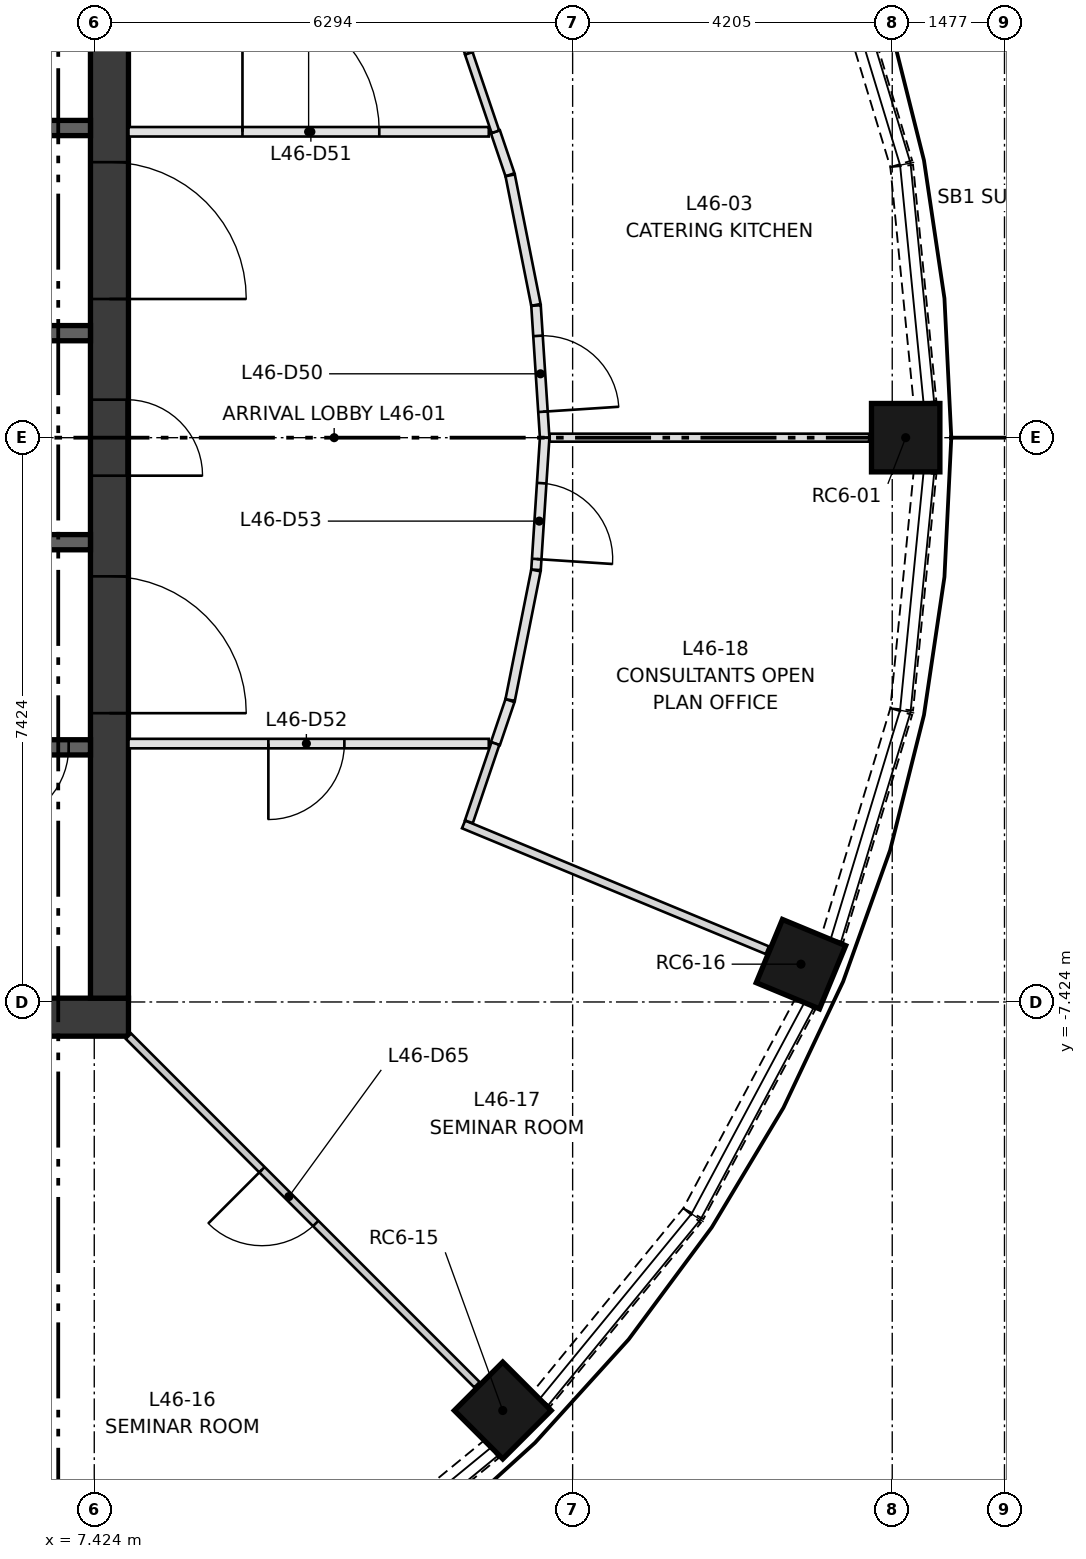
"""IFC4 building model, lengths in metres.
Left out: names, types, materials, properties, quantities, classifications, styles, units other than length and angle.
Written with IfcOpenShell. Run it as: python <this file> out.ifc"""

import sys

from ifc_helpers import new_model, si_unit, direction, frame, frame_2d, origin, origin_2d, place, context, subcontext, project, spatial, rectangle, extrude, element, fill, save


model = new_model("IFC4")
c1 = context("Model", 3, precision=1e-05, world=origin(), true_north=direction((0.0, 1.0)))
c2 = subcontext(c1, "Body", "Model", "MODEL_VIEW")
j1 = project(units=[si_unit("LENGTHUNIT", "METRE"), si_unit("PLANEANGLEUNIT", "RADIAN")], contexts=[c1])
p1 = place(None, origin())
s1 = spatial("IfcSite", under=j1, at=p1, CompositionType="ELEMENT")
p2 = place(p1, origin())
s2 = spatial("IfcBuilding", under=s1, at=p2, CompositionType="ELEMENT")
p3 = place(p2, frame((0.0, 0.0, 174.25)))
s3 = spatial("IfcBuildingStorey", under=s2, at=p3, CompositionType="ELEMENT", Elevation=174.25)
for number, where, z_axis, x_axis in (
    (1, (18.1, 0.0, 0.0), (0.0, 0.0, 1.0), (1.0, 0.0, 0.0)),
    (2, (12.799, -12.799, 0.0), (0.0, 0.0, 1.0), (0.707, -0.707, 0.0)),
    (3, (16.722, -6.927, 0.0), (0.0, 0.0, 1.0), (0.924, -0.383, 0.0)),
):
    element("IfcColumn", number, at=place(p3, frame(where, z_axis=z_axis, x_axis=x_axis)), inside=s3, PredefinedType="COLUMN", context=c2, shape_type="SweptSolid", body=[
        extrude(rectangle(XDim=0.9, YDim=0.9, at=origin_2d()), origin(), (0.0, 0.0, 1.0), 3.35),
    ])
p4 = place(p3, frame((-7.874, -7.624, 0.0), z_axis=(0.0, 0.0, 1.0), x_axis=(1.0, 0.0, 0.0)))
e4 = element("IfcWall", 4, at=p4, inside=s3, PredefinedType="SHEAR", context=c2, shape_type="SweptSolid", body=[
    extrude(rectangle(XDim=15.748, YDim=0.5, at=frame_2d((7.874, 0.0))), origin(), (0.0, 0.0, 1.0), 3.35),
])
p5 = place(p3, frame((7.624, -7.374, 0.0), z_axis=(0.0, 0.0, 1.0), x_axis=(0.0, 1.0, 0.0)))
e5 = element("IfcWall", 5, at=p5, inside=s3, PredefinedType="SHEAR", context=c2, shape_type="SweptSolid", body=[
    extrude(rectangle(XDim=14.748, YDim=0.5, at=frame_2d((7.374, 0.0))), origin(), (0.0, 0.0, 1.0), 3.35),
])
p6 = place(p5, frame((6.874, 0.0, 0.0)))
e6 = element("IfcOpeningElement", 6, at=p6, cuts=e5, PredefinedType="OPENING", context=c2, shape_type="SweptSolid", body=[
    extrude(rectangle(XDim=1.0, YDim=2.1, at=frame_2d((0.5, 1.05))), frame((0.0, 0.26, 0.0), z_axis=(0.0, -1.0, 0.0), x_axis=(1.0, 0.0, 0.0)), (0.0, 0.0, 1.0), 0.52),
])
p7 = place(p5, frame((3.75, 0.0, 0.0)))
e7 = element("IfcOpeningElement", 7, at=p7, cuts=e5, PredefinedType="OPENING", context=c2, shape_type="SweptSolid", body=[
    extrude(rectangle(XDim=1.8, YDim=2.1, at=frame_2d((0.9, 1.05))), frame((0.0, 0.26, 0.0), z_axis=(0.0, -1.0, 0.0), x_axis=(1.0, 0.0, 0.0)), (0.0, 0.0, 1.0), 0.52),
])
p8 = place(p5, frame((9.198, 0.0, 0.0)))
e8 = element("IfcOpeningElement", 8, at=p8, cuts=e5, PredefinedType="OPENING", context=c2, shape_type="SweptSolid", body=[
    extrude(rectangle(XDim=1.8, YDim=2.1, at=frame_2d((0.9, 1.05))), frame((0.0, 0.26, 0.0), z_axis=(0.0, -1.0, 0.0), x_axis=(1.0, 0.0, 0.0)), (0.0, 0.0, 1.0), 0.52),
])
p9 = place(p3, frame((-7.374, -4.074, 0.0), z_axis=(0.0, 0.0, 1.0), x_axis=(1.0, 0.0, 0.0)))
e9 = element("IfcWall", 9, at=p9, inside=s3, PredefinedType="SHEAR", context=c2, shape_type="SweptSolid", body=[
    extrude(rectangle(XDim=14.748, YDim=0.2, at=frame_2d((7.374, 0.0))), origin(), (0.0, 0.0, 1.0), 3.0),
])
p10 = place(p9, frame((1.319, 0.0, 0.0)))
e10 = element("IfcOpeningElement", 10, at=p10, cuts=e9, PredefinedType="OPENING", context=c2, shape_type="SweptSolid", body=[
    extrude(rectangle(XDim=1.1, YDim=2.1, at=frame_2d((0.55, 1.05))), frame((0.0, 0.11, 0.0), z_axis=(0.0, -1.0, 0.0), x_axis=(1.0, 0.0, 0.0)), (0.0, 0.0, 1.0), 0.22),
])
p11 = place(p9, frame((4.456, 0.0, 0.0)))
e11 = element("IfcOpeningElement", 11, at=p11, cuts=e9, PredefinedType="OPENING", context=c2, shape_type="SweptSolid", body=[
    extrude(rectangle(XDim=1.1, YDim=2.1, at=frame_2d((0.55, 1.05))), frame((0.0, 0.11, 0.0), z_axis=(0.0, -1.0, 0.0), x_axis=(1.0, 0.0, 0.0)), (0.0, 0.0, 1.0), 0.22),
])
p12 = place(p9, frame((7.551, 0.0, 0.0)))
e12 = element("IfcOpeningElement", 12, at=p12, cuts=e9, PredefinedType="OPENING", context=c2, shape_type="SweptSolid", body=[
    extrude(rectangle(XDim=1.0, YDim=2.1, at=frame_2d((0.5, 1.05))), frame((0.0, 0.11, 0.0), z_axis=(0.0, -1.0, 0.0), x_axis=(1.0, 0.0, 0.0)), (0.0, 0.0, 1.0), 0.22),
])
p13 = place(p9, frame((9.914, 0.0, 0.0)))
e13 = element("IfcOpeningElement", 13, at=p13, cuts=e9, PredefinedType="OPENING", context=c2, shape_type="SweptSolid", body=[
    extrude(rectangle(XDim=1.0, YDim=2.1, at=frame_2d((0.5, 1.05))), frame((0.0, 0.11, 0.0), z_axis=(0.0, -1.0, 0.0), x_axis=(1.0, 0.0, 0.0)), (0.0, 0.0, 1.0), 0.22),
])
p14 = place(p9, frame((11.688, 0.0, 0.0)))
e14 = element("IfcOpeningElement", 14, at=p14, cuts=e9, PredefinedType="OPENING", context=c2, shape_type="SweptSolid", body=[
    extrude(rectangle(XDim=1.0, YDim=2.1, at=frame_2d((0.5, 1.05))), frame((0.0, 0.11, 0.0), z_axis=(0.0, -1.0, 0.0), x_axis=(1.0, 0.0, 0.0)), (0.0, 0.0, 1.0), 0.22),
])
p15 = place(p9, frame((13.461, 0.0, 0.0)))
e15 = element("IfcOpeningElement", 15, at=p15, cuts=e9, PredefinedType="OPENING", context=c2, shape_type="SweptSolid", body=[
    extrude(rectangle(XDim=1.0, YDim=2.1, at=frame_2d((0.5, 1.05))), frame((0.0, 0.11, 0.0), z_axis=(0.0, -1.0, 0.0), x_axis=(1.0, 0.0, 0.0)), (0.0, 0.0, 1.0), 0.22),
])
p16 = place(p3, frame((0.0, 4.074, 0.0), z_axis=(0.0, 0.0, 1.0), x_axis=(1.0, 0.0, 0.0)))
e16 = element("IfcWall", 16, at=p16, inside=s3, PredefinedType="SHEAR", context=c2, shape_type="SweptSolid", body=[
    extrude(rectangle(XDim=7.374, YDim=0.2, at=frame_2d((3.687, 0.0))), origin(), (0.0, 0.0, 1.0), 3.0),
])
p17 = place(p16, frame((0.384, 0.0, 0.0)))
e17 = element("IfcOpeningElement", 17, at=p17, cuts=e16, PredefinedType="OPENING", context=c2, shape_type="SweptSolid", body=[
    extrude(rectangle(XDim=1.0, YDim=2.1, at=frame_2d((0.5, 1.05))), frame((0.0, 0.11, 0.0), z_axis=(0.0, -1.0, 0.0), x_axis=(1.0, 0.0, 0.0)), (0.0, 0.0, 1.0), 0.22),
])
p18 = place(p16, frame((2.153, 0.0, 0.0)))
e18 = element("IfcOpeningElement", 18, at=p18, cuts=e16, PredefinedType="OPENING", context=c2, shape_type="SweptSolid", body=[
    extrude(rectangle(XDim=1.0, YDim=2.1, at=frame_2d((0.5, 1.05))), frame((0.0, 0.11, 0.0), z_axis=(0.0, -1.0, 0.0), x_axis=(1.0, 0.0, 0.0)), (0.0, 0.0, 1.0), 0.22),
])
p19 = place(p16, frame((3.921, 0.0, 0.0)))
e19 = element("IfcOpeningElement", 19, at=p19, cuts=e16, PredefinedType="OPENING", context=c2, shape_type="SweptSolid", body=[
    extrude(rectangle(XDim=1.0, YDim=2.1, at=frame_2d((0.5, 1.05))), frame((0.0, 0.11, 0.0), z_axis=(0.0, -1.0, 0.0), x_axis=(1.0, 0.0, 0.0)), (0.0, 0.0, 1.0), 0.22),
])
p20 = place(p16, frame((5.79, 0.0, 0.0)))
e20 = element("IfcOpeningElement", 20, at=p20, cuts=e16, PredefinedType="OPENING", context=c2, shape_type="SweptSolid", body=[
    extrude(rectangle(XDim=0.8, YDim=2.1, at=frame_2d((0.4, 1.05))), frame((0.0, 0.11, 0.0), z_axis=(0.0, -1.0, 0.0), x_axis=(1.0, 0.0, 0.0)), (0.0, 0.0, 1.0), 0.22),
])
for number, where, z_axis, x_axis in (
    (21, (4.374, -1.375, 0.0), (0.0, 0.0, 1.0), (1.0, 0.0, 0.0)),
    (22, (4.374, 1.375, 0.0), (0.0, 0.0, 1.0), (1.0, 0.0, 0.0)),
):
    element("IfcWall", number, at=place(p3, frame(where, z_axis=z_axis, x_axis=x_axis)), inside=s3, PredefinedType="SHEAR", context=c2, shape_type="SweptSolid", body=[
        extrude(rectangle(XDim=3.0, YDim=0.2, at=frame_2d((1.5, 0.0))), origin(), (0.0, 0.0, 1.0), 3.0),
    ])
p21 = place(p3, frame((18.354, 0.464, 0.0), z_axis=(0.0, 0.0, 1.0), x_axis=(-0.098188848083, 0.995167799978, 0.0)))
e23 = element("IfcWall", 23, at=p21, inside=s3, PredefinedType="SOLIDWALL", context=c2, shape_type="SweptSolid", body=[
    extrude(rectangle(XDim=3.125, YDim=0.3, at=frame_2d((1.563, 0.0))), origin(), (0.0, 0.0, 1.0), 0.9),
])
p22 = place(p3, frame((18.042, 3.604, 0.0), z_axis=(0.0, 0.0, 1.0), x_axis=(-0.290083245834, 0.957001416136, 0.0)))
e24 = element("IfcWall", 24, at=p22, inside=s3, PredefinedType="SOLIDWALL", context=c2, shape_type="SweptSolid", body=[
    extrude(rectangle(XDim=3.127, YDim=0.3, at=frame_2d((1.563, 0.0))), origin(), (0.0, 0.0, 1.0), 0.9),
])
for number, where, z_axis, x_axis in (
    (25, (10.234, -15.29, 0.0), (0.0, 0.0, 1.0), (0.773, 0.634, 0.0)),
    (26, (13.306, -12.651, 0.0), (0.0, 0.0, 1.0), (0.634, 0.773, 0.0)),
):
    element("IfcWall", number, at=place(p3, frame(where, z_axis=z_axis, x_axis=x_axis)), inside=s3, PredefinedType="SOLIDWALL", context=c2, shape_type="SweptSolid", body=[
        extrude(rectangle(XDim=3.127, YDim=0.3, at=frame_2d((1.563, 0.0))), origin(), (0.0, 0.0, 1.0), 0.9),
    ])
p23 = place(p3, frame((15.306, -10.209, 0.0), z_axis=(0.0, 0.0, 1.0), x_axis=(0.47120441036, 0.882024038027, 0.0)))
e27 = element("IfcWall", 27, at=p23, inside=s3, PredefinedType="SOLIDWALL", context=c2, shape_type="SweptSolid", body=[
    extrude(rectangle(XDim=3.125, YDim=0.3, at=frame_2d((1.562, 0.0))), origin(), (0.0, 0.0, 1.0), 0.9),
])
p24 = place(p3, frame((17.135, -6.596, 0.0), z_axis=(0.0, 0.0, 1.0), x_axis=(0.290083245834, 0.957001416136, 0.0)))
e28 = element("IfcWall", 28, at=p24, inside=s3, PredefinedType="SOLIDWALL", context=c2, shape_type="SweptSolid", body=[
    extrude(rectangle(XDim=3.127, YDim=0.3, at=frame_2d((1.563, 0.0))), origin(), (0.0, 0.0, 1.0), 0.9),
])
p25 = place(p3, frame((18.048, -3.574, 0.0), z_axis=(0.0, 0.0, 1.0), x_axis=(0.098188848083, 0.995167799978, 0.0)))
e29 = element("IfcWall", 29, at=p25, inside=s3, PredefinedType="SOLIDWALL", context=c2, shape_type="SweptSolid", body=[
    extrude(rectangle(XDim=3.125, YDim=0.3, at=frame_2d((1.563, 0.0))), origin(), (0.0, 0.0, 1.0), 0.9),
])
p26 = place(p3, frame((12.702, 4.024, 0.0), z_axis=(0.0, 0.0, 1.0), x_axis=(0.321374914787, -0.946952038989, 0.0)))
e30 = element("IfcWall", 30, at=p26, inside=s3, PredefinedType="PARTITIONING", context=c2, shape_type="SweptSolid", body=[
    extrude(rectangle(XDim=0.597, YDim=0.125, at=frame_2d((0.299, 0.0))), origin(), (0.0, 0.0, 1.0), 3.0),
])
p27 = place(p3, frame((12.896, 3.451, 0.0), z_axis=(0.0, 0.0, 1.0), x_axis=(0.195116516296, -0.980780069673, 0.0)))
e31 = element("IfcWall", 31, at=p27, inside=s3, PredefinedType="PARTITIONING", context=c2, shape_type="SweptSolid", body=[
    extrude(rectangle(XDim=1.738, YDim=0.125, at=frame_2d((0.869, 0.0))), origin(), (0.0, 0.0, 1.0), 3.0),
])
p28 = place(p3, frame((13.236, 1.738, 0.0), z_axis=(0.0, 0.0, 1.0), x_axis=(0.065449256286, -0.997855898841, 0.0)))
e32 = element("IfcWall", 32, at=p28, inside=s3, PredefinedType="PARTITIONING", context=c2, shape_type="SweptSolid", body=[
    extrude(rectangle(XDim=1.742, YDim=0.125, at=frame_2d((0.871, 0.0))), origin(), (0.0, 0.0, 1.0), 3.0),
])
p29 = place(p28, frame((0.4, 0.0, 0.0)))
e33 = element("IfcOpeningElement", 33, at=p29, cuts=e32, PredefinedType="OPENING", context=c2, shape_type="SweptSolid", body=[
    extrude(rectangle(XDim=1.0, YDim=2.1, at=frame_2d((0.5, 1.05))), frame((0.0, 0.073, 0.0), z_axis=(0.0, -1.0, 0.0), x_axis=(1.0, 0.0, 0.0)), (0.0, 0.0, 1.0), 0.145),
])
p30 = place(p3, frame((7.874, 4.024, 0.0), z_axis=(0.0, 0.0, 1.0), x_axis=(1.0, 0.0, 0.0)))
e34 = element("IfcWall", 34, at=p30, inside=s3, PredefinedType="PARTITIONING", context=c2, shape_type="SweptSolid", body=[
    extrude(rectangle(XDim=4.741, YDim=0.125, at=frame_2d((2.37, 0.0))), origin(), (0.0, 0.0, 1.0), 3.0),
])
p31 = place(p30, frame((1.5, 0.0, 0.0)))
e35 = element("IfcOpeningElement", 35, at=p31, cuts=e34, PredefinedType="OPENING", context=c2, shape_type="SweptSolid", body=[
    extrude(rectangle(XDim=1.8, YDim=2.1, at=frame_2d((0.9, 1.05))), frame((0.0, 0.073, 0.0), z_axis=(0.0, -1.0, 0.0), x_axis=(1.0, 0.0, 0.0)), (0.0, 0.0, 1.0), 0.145),
])
p32 = place(p3, frame((12.615, -4.024, 0.0), z_axis=(0.0, 0.0, 1.0), x_axis=(-1.0, 0.0, 0.0)))
e36 = element("IfcWall", 36, at=p32, inside=s3, PredefinedType="PARTITIONING", context=c2, shape_type="SweptSolid", body=[
    extrude(rectangle(XDim=4.741, YDim=0.125, at=frame_2d((2.37, 0.0))), origin(), (0.0, 0.0, 1.0), 3.0),
])
p33 = place(p32, frame((1.9, 0.0, 0.0)))
e37 = element("IfcOpeningElement", 37, at=p33, cuts=e36, PredefinedType="OPENING", context=c2, shape_type="SweptSolid", body=[
    extrude(rectangle(XDim=1.0, YDim=2.1, at=frame_2d((0.5, 1.05))), frame((0.0, 0.073, 0.0), z_axis=(0.0, -1.0, 0.0), x_axis=(1.0, 0.0, 0.0)), (0.0, 0.0, 1.0), 0.145),
])
p34 = place(p3, frame((12.894, -3.459, 0.0), z_axis=(0.0, 0.0, 1.0), x_axis=(-0.321374914787, -0.946952038989, 0.0)))
e38 = element("IfcWall", 38, at=p34, inside=s3, PredefinedType="PARTITIONING", context=c2, shape_type="SweptSolid", body=[
    extrude(rectangle(XDim=0.597, YDim=0.125, at=frame_2d((0.299, 0.0))), origin(), (0.0, 0.0, 1.0), 3.0),
])
p35 = place(p3, frame((13.235, -1.747, 0.0), z_axis=(0.0, 0.0, 1.0), x_axis=(-0.195116516296, -0.980780069673, 0.0)))
e39 = element("IfcWall", 39, at=p35, inside=s3, PredefinedType="PARTITIONING", context=c2, shape_type="SweptSolid", body=[
    extrude(rectangle(XDim=1.738, YDim=0.125, at=frame_2d((0.869, 0.0))), origin(), (0.0, 0.0, 1.0), 3.0),
])
p36 = place(p3, frame((13.35, 0.0, 0.0), z_axis=(0.0, 0.0, 1.0), x_axis=(-0.065449256286, -0.997855898841, 0.0)))
e40 = element("IfcWall", 40, at=p36, inside=s3, PredefinedType="PARTITIONING", context=c2, shape_type="SweptSolid", body=[
    extrude(rectangle(XDim=1.742, YDim=0.125, at=frame_2d((0.871, 0.0))), origin(), (0.0, 0.0, 1.0), 3.0),
])
p37 = place(p36, frame((0.6, 0.0, 0.0)))
e41 = element("IfcOpeningElement", 41, at=p37, cuts=e40, PredefinedType="OPENING", context=c2, shape_type="SweptSolid", body=[
    extrude(rectangle(XDim=1.0, YDim=2.1, at=frame_2d((0.5, 1.05))), frame((0.0, 0.073, 0.0), z_axis=(0.0, -1.0, 0.0), x_axis=(1.0, 0.0, 0.0)), (0.0, 0.0, 1.0), 0.145),
])
p38 = place(p3, frame((12.285, 5.089, 0.0), z_axis=(0.0, 0.0, 1.0), x_axis=(0.923865378524, 0.382717601325, 0.0)))
e42 = element("IfcWall", 42, at=p38, inside=s3, PredefinedType="PARTITIONING", context=c2, shape_type="SweptSolid", body=[
    extrude(rectangle(XDim=4.323, YDim=0.105, at=frame_2d((2.161, 0.0))), origin(), (0.0, 0.0, 1.0), 3.0),
])
p39 = place(p3, frame((12.702, 4.024, 0.0), z_axis=(0.0, 0.0, 1.0), x_axis=(-0.321468654442, 0.946920220616, 0.0)))
e43 = element("IfcWall", 43, at=p39, inside=s3, PredefinedType="PARTITIONING", context=c2, shape_type="SweptSolid", body=[
    extrude(rectangle(XDim=1.089, YDim=0.105, at=frame_2d((0.544, 0.0))), origin(), (0.0, 0.0, 1.0), 3.0),
])
p40 = place(p3, frame((17.62, 0.0, 0.0), z_axis=(0.0, 0.0, 1.0), x_axis=(-1.0, 0.0, 0.0)))
e44 = element("IfcWall", 44, at=p40, inside=s3, PredefinedType="PARTITIONING", context=c2, shape_type="SweptSolid", body=[
    extrude(rectangle(XDim=4.204, YDim=0.105, at=frame_2d((2.102, 0.0))), origin(), (0.0, 0.0, 1.0), 3.0),
])
p41 = place(p3, frame((12.459, -12.459, 0.0), z_axis=(0.0, 0.0, 1.0), x_axis=(-0.707106781187, 0.707106781187, 0.0)))
e45 = element("IfcWall", 45, at=p41, inside=s3, PredefinedType="PARTITIONING", context=c2, shape_type="SweptSolid", body=[
    extrude(rectangle(XDim=6.484, YDim=0.1, at=frame_2d((3.242, 0.0))), origin(), (0.0, 0.0, 1.0), 3.0),
])
p42 = place(p41, frame((3.0, 0.0, 0.0)))
e46 = element("IfcOpeningElement", 46, at=p42, cuts=e45, PredefinedType="OPENING", context=c2, shape_type="SweptSolid", body=[
    extrude(rectangle(XDim=1.0, YDim=2.1, at=frame_2d((0.5, 1.05))), frame((0.0, 0.06, 0.0), z_axis=(0.0, -1.0, 0.0), x_axis=(1.0, 0.0, 0.0)), (0.0, 0.0, 1.0), 0.12),
])
p43 = place(p3, frame((12.283, -5.088, 0.0), z_axis=(0.0, 0.0, 1.0), x_axis=(0.923888181348, -0.382662551559, 0.0)))
e47 = element("IfcWall", 47, at=p43, inside=s3, PredefinedType="PARTITIONING", context=c2, shape_type="SweptSolid", body=[
    extrude(rectangle(XDim=4.325, YDim=0.11, at=frame_2d((2.163, 0.0))), origin(), (0.0, 0.0, 1.0), 3.0),
])
p44 = place(p3, frame((12.702, -4.024, 0.0), z_axis=(0.0, 0.0, 1.0), x_axis=(-0.321346724307, -0.946961605756, 0.0)))
e48 = element("IfcWall", 48, at=p44, inside=s3, PredefinedType="PARTITIONING", context=c2, shape_type="SweptSolid", body=[
    extrude(rectangle(XDim=1.086, YDim=0.11, at=frame_2d((0.543, 0.0))), origin(), (0.0, 0.0, 1.0), 3.0),
])
p45 = place(p15, frame((1.0, 0.0, 0.0), z_axis=(0.0, 0.0, 1.0), x_axis=(-1.0, 0.0, 0.0)))
e49 = element("IfcDoor", 49, at=p45, inside=s3, OperationType="SINGLE_SWING_LEFT", PredefinedType="DOOR", context=c2, shape_type="SweptSolid", body=[
    extrude(rectangle(XDim=1.0, YDim=2.1, at=frame_2d((0.5, 1.05))), frame((0.0, 0.025, 0.0), z_axis=(0.0, -1.0, 0.0), x_axis=(1.0, 0.0, 0.0)), (0.0, 0.0, 1.0), 0.05),
])
fill(e15, e49)
p46 = place(p6, frame((1.0, 0.0, 0.0), z_axis=(0.0, 0.0, 1.0), x_axis=(-1.0, 0.0, 0.0)))
e50 = element("IfcDoor", 50, at=p46, inside=s3, OperationType="SINGLE_SWING_LEFT", PredefinedType="DOOR", context=c2, shape_type="SweptSolid", body=[
    extrude(rectangle(XDim=1.0, YDim=2.1, at=frame_2d((0.5, 1.05))), frame((0.0, 0.25, 0.0), z_axis=(0.0, -1.0, 0.0), x_axis=(1.0, 0.0, 0.0)), (0.0, 0.0, 1.0), 0.05),
])
fill(e6, e50)
p47 = place(p7, frame((1.8, 0.0, 0.0), z_axis=(0.0, 0.0, 1.0), x_axis=(-1.0, 0.0, 0.0)))
e51 = element("IfcDoor", 51, at=p47, inside=s3, OperationType="DOUBLE_DOOR_SINGLE_SWING", PredefinedType="DOOR", context=c2, shape_type="SweptSolid", body=[
    extrude(rectangle(XDim=1.8, YDim=2.1, at=frame_2d((0.9, 1.05))), frame((0.0, 0.025, 0.0), z_axis=(0.0, -1.0, 0.0), x_axis=(1.0, 0.0, 0.0)), (0.0, 0.0, 1.0), 0.05),
])
fill(e7, e51)
p48 = place(p8, frame((1.8, 0.0, 0.0), z_axis=(0.0, 0.0, 1.0), x_axis=(-1.0, 0.0, 0.0)))
e52 = element("IfcDoor", 52, at=p48, inside=s3, OperationType="DOUBLE_DOOR_SINGLE_SWING", PredefinedType="DOOR", context=c2, shape_type="SweptSolid", body=[
    extrude(rectangle(XDim=1.8, YDim=2.1, at=frame_2d((0.9, 1.05))), frame((0.0, 0.025, 0.0), z_axis=(0.0, -1.0, 0.0), x_axis=(1.0, 0.0, 0.0)), (0.0, 0.0, 1.0), 0.05),
])
fill(e8, e52)
p49 = place(p29, origin())
e53 = element("IfcDoor", 53, at=p49, inside=s3, OperationType="SINGLE_SWING_RIGHT", PredefinedType="DOOR", context=c2, shape_type="SweptSolid", body=[
    extrude(rectangle(XDim=1.0, YDim=2.1, at=frame_2d((0.5, 1.05))), frame((0.0, 0.025, 0.0), z_axis=(0.0, -1.0, 0.0), x_axis=(1.0, 0.0, 0.0)), (0.0, 0.0, 1.0), 0.05),
])
fill(e33, e53)
p50 = place(p31, origin())
e54 = element("IfcDoor", 54, at=p50, inside=s3, OperationType="DOUBLE_DOOR_SINGLE_SWING", PredefinedType="DOOR", context=c2, shape_type="SweptSolid", body=[
    extrude(rectangle(XDim=1.8, YDim=2.1, at=frame_2d((0.9, 1.05))), frame((0.0, 0.025, 0.0), z_axis=(0.0, -1.0, 0.0), x_axis=(1.0, 0.0, 0.0)), (0.0, 0.0, 1.0), 0.05),
])
fill(e35, e54)
p51 = place(p33, origin())
e55 = element("IfcDoor", 55, at=p51, inside=s3, OperationType="SINGLE_SWING_RIGHT", PredefinedType="DOOR", context=c2, shape_type="SweptSolid", body=[
    extrude(rectangle(XDim=1.0, YDim=2.1, at=frame_2d((0.5, 1.05))), frame((0.0, 0.025, 0.0), z_axis=(0.0, -1.0, 0.0), x_axis=(1.0, 0.0, 0.0)), (0.0, 0.0, 1.0), 0.05),
])
fill(e37, e55)
p52 = place(p37, origin())
e56 = element("IfcDoor", 56, at=p52, inside=s3, OperationType="SINGLE_SWING_RIGHT", PredefinedType="DOOR", context=c2, shape_type="SweptSolid", body=[
    extrude(rectangle(XDim=1.0, YDim=2.1, at=frame_2d((0.5, 1.05))), frame((0.0, 0.025, 0.0), z_axis=(0.0, -1.0, 0.0), x_axis=(1.0, 0.0, 0.0)), (0.0, 0.0, 1.0), 0.05),
])
fill(e41, e56)
p53 = place(p42, origin())
e57 = element("IfcDoor", 57, at=p53, inside=s3, OperationType="SINGLE_SWING_RIGHT", PredefinedType="DOOR", context=c2, shape_type="SweptSolid", body=[
    extrude(rectangle(XDim=1.0, YDim=2.1, at=frame_2d((0.5, 1.05))), frame((0.0, 0.025, 0.0), z_axis=(0.0, -1.0, 0.0), x_axis=(1.0, 0.0, 0.0)), (0.0, 0.0, 1.0), 0.05),
])
fill(e46, e57)
save(model, sys.argv[1])
